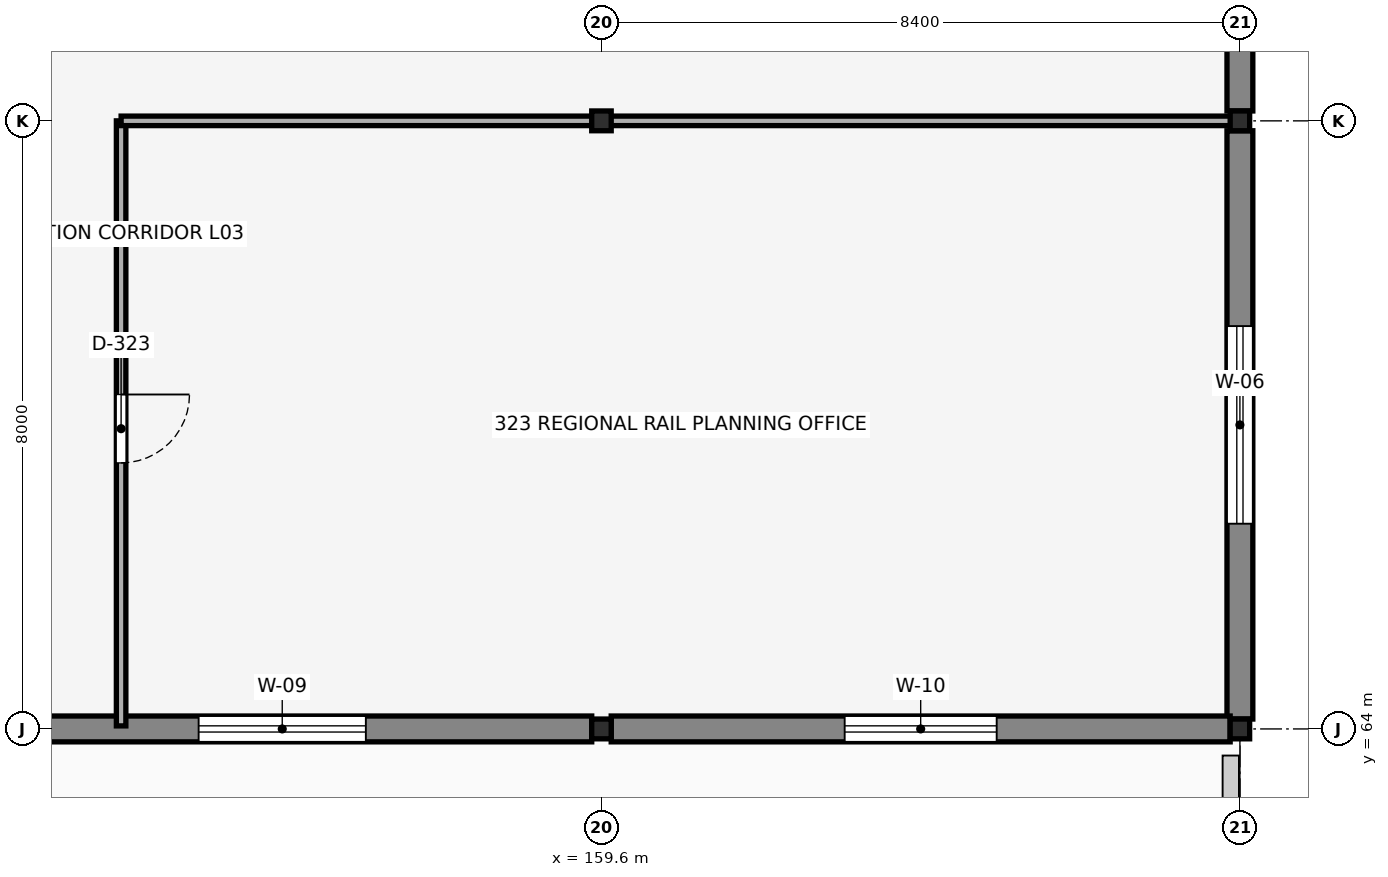
"""IFC4 building model, lengths in metres.
Left out: names, types, materials, properties, quantities, classifications, styles, units other than length and angle.
Written with IfcOpenShell. Run it as: python <this file> out.ifc"""

import sys

from ifc_helpers import new_model, si_unit, direction, frame, frame_2d, origin, origin_2d, place, context, subcontext, project, spatial, rectangle, i_section, extrude, element, fill, save


model = new_model("IFC4")
c1 = context("Model", 3, precision=1e-05, world=origin(), true_north=direction((0.0, 1.0)))
c2 = subcontext(c1, "Body", "Model", "MODEL_VIEW")
j1 = project(units=[si_unit("LENGTHUNIT", "METRE"), si_unit("PLANEANGLEUNIT", "RADIAN")], contexts=[c1])
p1 = place(None, origin())
s1 = spatial("IfcSite", under=j1, at=p1, CompositionType="ELEMENT")
p2 = place(p1, origin())
s2 = spatial("IfcBuilding", under=s1, at=p2, CompositionType="ELEMENT")
p3 = place(p2, frame((0.0, 0.0, 13.36)))
s3 = spatial("IfcBuildingStorey", under=s2, at=p3, CompositionType="ELEMENT", Elevation=13.36)
for number, where, z_axis, x_axis in (
    (1, (159.6, 64.0, 0.0), (0.0, 0.0, 1.0), (1.0, 0.0, 0.0)),
    (2, (159.6, 72.0, 0.0), (0.0, 0.0, 1.0), (1.0, 0.0, 0.0)),
    (3, (168.0, 64.0, 0.0), (0.0, 0.0, 1.0), (1.0, 0.0, 0.0)),
    (4, (168.0, 72.0, 0.0), (0.0, 0.0, 1.0), (1.0, 0.0, 0.0)),
):
    element("IfcColumn", number, at=place(p3, frame(where, z_axis=z_axis, x_axis=x_axis)), inside=s3, PredefinedType="COLUMN", context=c2, shape_type="SweptSolid", body=[
        extrude(i_section(OverallWidth=0.256, OverallDepth=0.26, WebThickness=0.01, FlangeThickness=0.017, FilletRadius=0.013, at=origin_2d()), origin(), (0.0, 0.0, 1.0), 3.58),
    ])
p4 = place(p3, frame((168.0, 64.13, 0.0), z_axis=(0.0, 0.0, 1.0), x_axis=(0.0, 1.0, 0.0)))
e5 = element("IfcWall", 5, at=p4, inside=s3, PredefinedType="SOLIDWALL", context=c2, shape_type="SweptSolid", body=[
    extrude(rectangle(XDim=7.74, YDim=0.34, at=frame_2d((3.87, 0.0))), origin(), (0.0, 0.0, 1.0), 3.28),
])
p5 = place(p4, frame((2.57, 0.0, 0.9), z_axis=(0.0, 0.0, 1.0), x_axis=(1.0, 0.0, 0.0)))
e6 = element("IfcOpeningElement", 6, at=p5, cuts=e5, PredefinedType="OPENING", context=c2, shape_type="SweptSolid", body=[
    extrude(rectangle(XDim=2.6, YDim=1.8, at=frame_2d((1.3, 0.9))), frame((0.0, 0.18, 0.0), z_axis=(0.0, -1.0, 0.0), x_axis=(1.0, 0.0, 0.0)), (0.0, 0.0, 1.0), 0.36),
])
p6 = place(p3, frame((168.0, 72.13, 0.0), z_axis=(0.0, 0.0, 1.0), x_axis=(0.0, 1.0, 0.0)))
e7 = element("IfcWall", 7, at=p6, inside=s3, PredefinedType="SOLIDWALL", context=c2, shape_type="SweptSolid", body=[
    extrude(rectangle(XDim=7.74, YDim=0.34, at=frame_2d((3.87, 0.0))), origin(), (0.0, 0.0, 1.0), 3.28),
])
p7 = place(p3, frame((151.328, 64.0, 0.0), z_axis=(0.0, 0.0, 1.0), x_axis=(1.0, 0.0, 0.0)))
e8 = element("IfcWall", 8, at=p7, inside=s3, PredefinedType="SOLIDWALL", context=c2, shape_type="SweptSolid", body=[
    extrude(rectangle(XDim=8.144, YDim=0.34, at=frame_2d((4.072, 0.0))), origin(), (0.0, 0.0, 1.0), 3.28),
])
p8 = place(p7, frame((2.972, 0.0, 0.9), z_axis=(0.0, 0.0, 1.0), x_axis=(1.0, 0.0, 0.0)))
e9 = element("IfcOpeningElement", 9, at=p8, cuts=e8, PredefinedType="OPENING", context=c2, shape_type="SweptSolid", body=[
    extrude(rectangle(XDim=2.2, YDim=1.5, at=frame_2d((1.1, 0.75))), frame((0.0, 0.18, 0.0), z_axis=(0.0, -1.0, 0.0), x_axis=(1.0, 0.0, 0.0)), (0.0, 0.0, 1.0), 0.36),
])
p9 = place(p3, frame((159.728, 64.0, 0.0), z_axis=(0.0, 0.0, 1.0), x_axis=(1.0, 0.0, 0.0)))
e10 = element("IfcWall", 10, at=p9, inside=s3, PredefinedType="SOLIDWALL", context=c2, shape_type="SweptSolid", body=[
    extrude(rectangle(XDim=8.144, YDim=0.34, at=frame_2d((4.072, 0.0))), origin(), (0.0, 0.0, 1.0), 3.28),
])
p10 = place(p9, frame((3.072, 0.0, 0.9), z_axis=(0.0, 0.0, 1.0), x_axis=(1.0, 0.0, 0.0)))
e11 = element("IfcOpeningElement", 11, at=p10, cuts=e10, PredefinedType="OPENING", context=c2, shape_type="SweptSolid", body=[
    extrude(rectangle(XDim=2.0, YDim=1.5, at=frame_2d((1.0, 0.75))), frame((0.0, 0.18, 0.0), z_axis=(0.0, -1.0, 0.0), x_axis=(1.0, 0.0, 0.0)), (0.0, 0.0, 1.0), 0.36),
])
p11 = place(p3, frame((167.88, 63.65, 0.0), z_axis=(0.0, 0.0, 1.0), x_axis=(0.0, -1.0, 0.0)))
e12 = element("IfcWall", 12, at=p11, inside=s3, PredefinedType="PARAPET", context=c2, shape_type="SweptSolid", body=[
    extrude(rectangle(XDim=7.53, YDim=0.215, at=frame_2d((3.765, 0.0))), origin(), (0.0, 0.0, 1.0), 1.05),
])
p12 = place(p3, frame((153.28, 64.04, 0.0), z_axis=(0.0, 0.0, 1.0), x_axis=(0.0, 1.0, 0.0)))
e13 = element("IfcWall", 13, at=p12, inside=s3, PredefinedType="PARTITIONING", context=c2, shape_type="SweptSolid", body=[
    extrude(rectangle(XDim=7.96, YDim=0.125, at=frame_2d((3.98, 0.0))), origin(), (0.0, 0.0, 1.0), 3.58),
])
p13 = place(p12, frame((4.36, 0.0, 0.0), z_axis=(0.0, 0.0, 1.0), x_axis=(-1.0, 0.0, 0.0)))
e14 = element("IfcOpeningElement", 14, at=p13, cuts=e13, PredefinedType="OPENING", context=c2, shape_type="SweptSolid", body=[
    extrude(rectangle(XDim=0.9, YDim=2.1, at=frame_2d((0.45, 1.05))), frame((0.0, 0.073, 0.0), z_axis=(0.0, -1.0, 0.0), x_axis=(1.0, 0.0, 0.0)), (0.0, 0.0, 1.0), 0.145),
])
p14 = place(p3, frame((153.28, 72.0, 0.0), z_axis=(0.0, 0.0, 1.0), x_axis=(1.0, 0.0, 0.0)))
e15 = element("IfcWall", 15, at=p14, inside=s3, PredefinedType="PARTITIONING", context=c2, shape_type="SweptSolid", body=[
    extrude(rectangle(XDim=6.202, YDim=0.125, at=frame_2d((3.101, 0.0))), origin(), (0.0, 0.0, 1.0), 3.123),
])
p15 = place(p3, frame((159.718, 72.0, 0.0), z_axis=(0.0, 0.0, 1.0), x_axis=(1.0, 0.0, 0.0)))
e16 = element("IfcWall", 16, at=p15, inside=s3, PredefinedType="PARTITIONING", context=c2, shape_type="SweptSolid", body=[
    extrude(rectangle(XDim=8.164, YDim=0.125, at=frame_2d((4.082, 0.0))), origin(), (0.0, 0.0, 1.0), 3.123),
])
p16 = place(p5, origin())
e17 = element("IfcWindow", 17, at=p16, inside=s3, PartitioningType="DOUBLE_PANEL_VERTICAL", PredefinedType="WINDOW", context=c2, shape_type="SweptSolid", body=[
    extrude(rectangle(XDim=2.6, YDim=1.8, at=frame_2d((1.3, 0.9))), frame((0.0, 0.03, 0.0), z_axis=(0.0, -1.0, 0.0), x_axis=(1.0, 0.0, 0.0)), (0.0, 0.0, 1.0), 0.06),
])
fill(e6, e17)
p17 = place(p8, origin())
e18 = element("IfcWindow", 18, at=p17, inside=s3, PartitioningType="DOUBLE_PANEL_VERTICAL", PredefinedType="WINDOW", context=c2, shape_type="SweptSolid", body=[
    extrude(rectangle(XDim=2.2, YDim=1.5, at=frame_2d((1.1, 0.75))), frame((0.0, 0.03, 0.0), z_axis=(0.0, -1.0, 0.0), x_axis=(1.0, 0.0, 0.0)), (0.0, 0.0, 1.0), 0.06),
])
fill(e9, e18)
p18 = place(p10, origin())
e19 = element("IfcWindow", 19, at=p18, inside=s3, PartitioningType="DOUBLE_PANEL_VERTICAL", PredefinedType="WINDOW", context=c2, shape_type="SweptSolid", body=[
    extrude(rectangle(XDim=2.0, YDim=1.5, at=frame_2d((1.0, 0.75))), frame((0.0, 0.03, 0.0), z_axis=(0.0, -1.0, 0.0), x_axis=(1.0, 0.0, 0.0)), (0.0, 0.0, 1.0), 0.06),
])
fill(e11, e19)
p19 = place(p13, origin())
e20 = element("IfcDoor", 20, at=p19, inside=s3, OperationType="SINGLE_SWING_LEFT", PredefinedType="DOOR", context=c2, shape_type="SweptSolid", body=[
    extrude(rectangle(XDim=0.9, YDim=2.1, at=frame_2d((0.45, 1.05))), frame((0.0, 0.025, 0.0), z_axis=(0.0, -1.0, 0.0), x_axis=(1.0, 0.0, 0.0)), (0.0, 0.0, 1.0), 0.05),
])
fill(e14, e20)
save(model, sys.argv[1])
